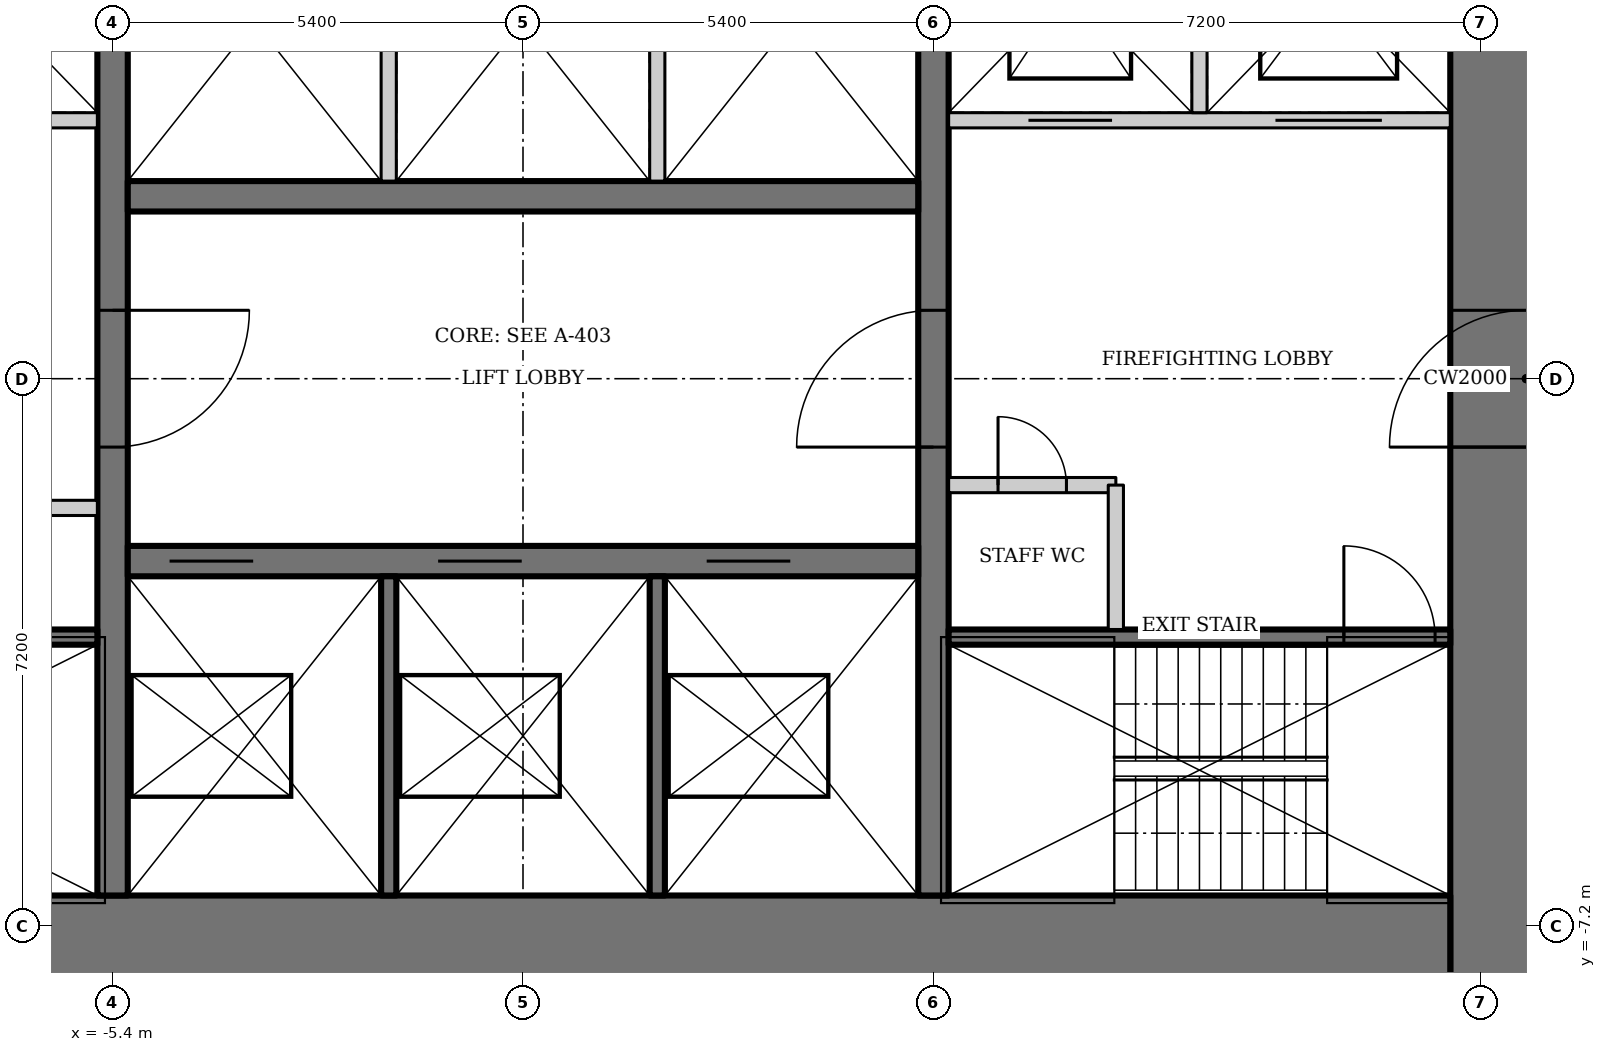
"""IFC4 building model, lengths in metres.
Left out: names, types, materials, properties, quantities, classifications, styles, units other than length and angle.
Written with IfcOpenShell. Run it as: python <this file> out.ifc"""

import sys

from ifc_helpers import new_model, si_unit, direction, frame, frame_2d, origin, place, context, subcontext, project, spatial, rectangle, extrude, element, fill, save


model = new_model("IFC4")
c1 = context("Model", 3, precision=1e-05, world=origin(), true_north=direction((0.0, 1.0)))
c2 = subcontext(c1, "Body", "Model", "MODEL_VIEW")
j1 = project(units=[si_unit("LENGTHUNIT", "METRE"), si_unit("PLANEANGLEUNIT", "RADIAN")], contexts=[c1])
p1 = place(None, origin())
s1 = spatial("IfcSite", under=j1, at=p1, CompositionType="ELEMENT")
p2 = place(p1, origin())
s2 = spatial("IfcBuilding", under=s1, at=p2, CompositionType="ELEMENT")
p3 = place(p2, frame((0.0, 0.0, 76.6)))
s3 = spatial("IfcBuildingStorey", under=s2, at=p3, CompositionType="ELEMENT", Elevation=76.6)
p4 = place(p3, frame((13.2, -13.0, 0.0), z_axis=(0.0, 0.0, 1.0), x_axis=(0.0, 1.0, 0.0)))
e1 = element("IfcWall", 1, at=p4, inside=s3, PredefinedType="SHEAR", context=c2, shape_type="SweptSolid", body=[
    extrude(rectangle(XDim=26.0, YDim=2.0, at=frame_2d((13.0, 0.0))), origin(), (0.0, 0.0, 1.0), 3.6),
])
p5 = place(p4, frame((12.1, 0.0, 0.0)))
e2 = element("IfcOpeningElement", 2, at=p5, cuts=e1, PredefinedType="OPENING", context=c2, shape_type="SweptSolid", body=[
    extrude(rectangle(XDim=1.8, YDim=2.1, at=frame_2d((0.9, 1.05))), frame((0.0, 1.01, 0.0), z_axis=(0.0, -1.0, 0.0), x_axis=(1.0, 0.0, 0.0)), (0.0, 0.0, 1.0), 2.02),
])
p6 = place(p3, frame((-12.2, -8.0, 0.0), z_axis=(0.0, 0.0, 1.0), x_axis=(1.0, 0.0, 0.0)))
e3 = element("IfcWall", 3, at=p6, inside=s3, PredefinedType="SHEAR", context=c2, shape_type="SweptSolid", body=[
    extrude(rectangle(XDim=24.4, YDim=2.4, at=frame_2d((12.2, 0.0))), origin(), (0.0, 0.0, 1.0), 3.6),
])
p7 = place(p3, frame((5.4, -6.8, 0.0), z_axis=(0.0, 0.0, 1.0), x_axis=(0.0, 1.0, 0.0)))
e4 = element("IfcWall", 4, at=p7, inside=s3, PredefinedType="SHEAR", context=c2, shape_type="SweptSolid", body=[
    extrude(rectangle(XDim=13.6, YDim=0.4, at=frame_2d((6.8, 0.0))), origin(), (0.0, 0.0, 1.0), 3.6),
])
p8 = place(p7, frame((5.9, 0.0, 0.0)))
e5 = element("IfcOpeningElement", 5, at=p8, cuts=e4, PredefinedType="OPENING", context=c2, shape_type="SweptSolid", body=[
    extrude(rectangle(XDim=1.8, YDim=2.1, at=frame_2d((0.9, 1.05))), frame((0.0, 0.21, 0.0), z_axis=(0.0, -1.0, 0.0), x_axis=(1.0, 0.0, 0.0)), (0.0, 0.0, 1.0), 0.42),
])
p9 = place(p3, frame((-5.4, 6.8, 0.0), z_axis=(0.0, 0.0, 1.0), x_axis=(0.0, -1.0, 0.0)))
e6 = element("IfcWall", 6, at=p9, inside=s3, PredefinedType="SHEAR", context=c2, shape_type="SweptSolid", body=[
    extrude(rectangle(XDim=13.6, YDim=0.4, at=frame_2d((6.8, 0.0))), origin(), (0.0, 0.0, 1.0), 3.6),
])
p10 = place(p9, frame((5.9, 0.0, 0.0)))
e7 = element("IfcOpeningElement", 7, at=p10, cuts=e6, PredefinedType="OPENING", context=c2, shape_type="SweptSolid", body=[
    extrude(rectangle(XDim=1.8, YDim=2.1, at=frame_2d((0.9, 1.05))), frame((0.0, 0.21, 0.0), z_axis=(0.0, -1.0, 0.0), x_axis=(1.0, 0.0, 0.0)), (0.0, 0.0, 1.0), 0.42),
])
p11 = place(p3, frame((-5.2, -2.4, 0.0), z_axis=(0.0, 0.0, 1.0), x_axis=(1.0, 0.0, 0.0)))
e8 = element("IfcWall", 8, at=p11, inside=s3, PredefinedType="SHEAR", context=c2, shape_type="SweptSolid", body=[
    extrude(rectangle(XDim=10.4, YDim=0.4, at=frame_2d((5.2, 0.0))), origin(), (0.0, 0.0, 1.0), 3.6),
])
p12 = place(p11, frame((0.55, 0.0, 0.0)))
e9 = element("IfcOpeningElement", 9, at=p12, cuts=e8, PredefinedType="OPENING", context=c2, shape_type="SweptSolid", body=[
    extrude(rectangle(XDim=1.1, YDim=2.2, at=frame_2d((0.55, 1.1))), frame((0.0, 0.21, 0.0), z_axis=(0.0, -1.0, 0.0), x_axis=(1.0, 0.0, 0.0)), (0.0, 0.0, 1.0), 0.42),
])
p13 = place(p11, frame((4.083, 0.0, 0.0)))
e10 = element("IfcOpeningElement", 10, at=p13, cuts=e8, PredefinedType="OPENING", context=c2, shape_type="SweptSolid", body=[
    extrude(rectangle(XDim=1.1, YDim=2.2, at=frame_2d((0.55, 1.1))), frame((0.0, 0.21, 0.0), z_axis=(0.0, -1.0, 0.0), x_axis=(1.0, 0.0, 0.0)), (0.0, 0.0, 1.0), 0.42),
])
p14 = place(p11, frame((7.617, 0.0, 0.0)))
e11 = element("IfcOpeningElement", 11, at=p14, cuts=e8, PredefinedType="OPENING", context=c2, shape_type="SweptSolid", body=[
    extrude(rectangle(XDim=1.1, YDim=2.2, at=frame_2d((0.55, 1.1))), frame((0.0, 0.21, 0.0), z_axis=(0.0, -1.0, 0.0), x_axis=(1.0, 0.0, 0.0)), (0.0, 0.0, 1.0), 0.42),
])
for number, where, z_axis, x_axis in (
    (12, (-1.767, -2.6, 0.0), (0.0, 0.0, 1.0), (0.0, -1.0, 0.0)),
    (13, (1.767, -2.6, 0.0), (0.0, 0.0, 1.0), (0.0, -1.0, 0.0)),
):
    element("IfcWall", number, at=place(p3, frame(where, z_axis=z_axis, x_axis=x_axis)), inside=s3, PredefinedType="SOLIDWALL", context=c2, shape_type="SweptSolid", body=[
        extrude(rectangle(XDim=4.2, YDim=0.2, at=frame_2d((2.1, 0.0))), origin(), (0.0, 0.0, 1.0), 3.6),
    ])
p15 = place(p3, frame((5.2, 2.4, 0.0), z_axis=(0.0, 0.0, 1.0), x_axis=(-1.0, 0.0, 0.0)))
e14 = element("IfcWall", 14, at=p15, inside=s3, PredefinedType="SHEAR", context=c2, shape_type="SweptSolid", body=[
    extrude(rectangle(XDim=10.4, YDim=0.4, at=frame_2d((5.2, 0.0))), origin(), (0.0, 0.0, 1.0), 3.6),
])
for number, where, z_axis, x_axis in (
    (15, (-1.767, 2.6, 0.0), (0.0, 0.0, 1.0), (0.0, 1.0, 0.0)),
    (16, (1.767, 2.6, 0.0), (0.0, 0.0, 1.0), (0.0, 1.0, 0.0)),
):
    element("IfcWall", number, at=place(p3, frame(where, z_axis=z_axis, x_axis=x_axis)), inside=s3, PredefinedType="SOLIDWALL", context=c2, shape_type="SweptSolid", body=[
        extrude(rectangle(XDim=4.2, YDim=0.2, at=frame_2d((2.1, 0.0))), origin(), (0.0, 0.0, 1.0), 3.6),
    ])
p16 = place(p3, frame((5.6, -3.4, 0.0), z_axis=(0.0, 0.0, 1.0), x_axis=(1.0, 0.0, 0.0)))
e17 = element("IfcWall", 17, at=p16, inside=s3, PredefinedType="SHEAR", context=c2, shape_type="SweptSolid", body=[
    extrude(rectangle(XDim=6.6, YDim=0.2, at=frame_2d((3.3, 0.0))), origin(), (0.0, 0.0, 1.0), 3.6),
])
p17 = place(p16, frame((5.2, 0.0, 0.0)))
e18 = element("IfcOpeningElement", 18, at=p17, cuts=e17, PredefinedType="OPENING", context=c2, shape_type="SweptSolid", body=[
    extrude(rectangle(XDim=1.2, YDim=2.1, at=frame_2d((0.6, 1.05))), frame((0.0, 0.11, 0.0), z_axis=(0.0, -1.0, 0.0), x_axis=(1.0, 0.0, 0.0)), (0.0, 0.0, 1.0), 0.22),
])
p18 = place(p3, frame((12.2, 3.4, 0.0), z_axis=(0.0, 0.0, 1.0), x_axis=(-1.0, 0.0, 0.0)))
e19 = element("IfcWall", 19, at=p18, inside=s3, PredefinedType="SOLIDWALL", context=c2, shape_type="SweptSolid", body=[
    extrude(rectangle(XDim=6.6, YDim=0.2, at=frame_2d((3.3, 0.0))), origin(), (0.0, 0.0, 1.0), 3.6),
])
p19 = place(p18, frame((4.45, 0.0, 0.0)))
e20 = element("IfcOpeningElement", 20, at=p19, cuts=e19, PredefinedType="OPENING", context=c2, shape_type="SweptSolid", body=[
    extrude(rectangle(XDim=1.1, YDim=2.2, at=frame_2d((0.55, 1.1))), frame((0.0, 0.11, 0.0), z_axis=(0.0, -1.0, 0.0), x_axis=(1.0, 0.0, 0.0)), (0.0, 0.0, 1.0), 0.22),
])
p20 = place(p18, frame((0.9, 0.0, 0.0)))
e21 = element("IfcOpeningElement", 21, at=p20, cuts=e19, PredefinedType="OPENING", context=c2, shape_type="SweptSolid", body=[
    extrude(rectangle(XDim=1.4, YDim=2.2, at=frame_2d((0.7, 1.1))), frame((0.0, 0.11, 0.0), z_axis=(0.0, -1.0, 0.0), x_axis=(1.0, 0.0, 0.0)), (0.0, 0.0, 1.0), 0.22),
])
p21 = place(p3, frame((8.9, 3.5, 0.0), z_axis=(0.0, 0.0, 1.0), x_axis=(0.0, 1.0, 0.0)))
e22 = element("IfcWall", 22, at=p21, inside=s3, PredefinedType="SOLIDWALL", context=c2, shape_type="SweptSolid", body=[
    extrude(rectangle(XDim=3.3, YDim=0.2, at=frame_2d((1.65, 0.0))), origin(), (0.0, 0.0, 1.0), 3.6),
])
p22 = place(p3, frame((-5.6, -3.4, 0.0), z_axis=(0.0, 0.0, 1.0), x_axis=(-1.0, 0.0, 0.0)))
e23 = element("IfcWall", 23, at=p22, inside=s3, PredefinedType="SHEAR", context=c2, shape_type="SweptSolid", body=[
    extrude(rectangle(XDim=6.6, YDim=0.2, at=frame_2d((3.3, 0.0))), origin(), (0.0, 0.0, 1.0), 3.6),
])
p23 = place(p22, frame((5.2, 0.0, 0.0)))
e24 = element("IfcOpeningElement", 24, at=p23, cuts=e23, PredefinedType="OPENING", context=c2, shape_type="SweptSolid", body=[
    extrude(rectangle(XDim=1.2, YDim=2.1, at=frame_2d((0.6, 1.05))), frame((0.0, 0.11, 0.0), z_axis=(0.0, -1.0, 0.0), x_axis=(1.0, 0.0, 0.0)), (0.0, 0.0, 1.0), 0.22),
])
p24 = place(p3, frame((-12.2, 3.4, 0.0), z_axis=(0.0, 0.0, 1.0), x_axis=(1.0, 0.0, 0.0)))
e25 = element("IfcWall", 25, at=p24, inside=s3, PredefinedType="SOLIDWALL", context=c2, shape_type="SweptSolid", body=[
    extrude(rectangle(XDim=6.6, YDim=0.2, at=frame_2d((3.3, 0.0))), origin(), (0.0, 0.0, 1.0), 3.6),
])
p25 = place(p24, frame((1.05, 0.0, 0.0)))
e26 = element("IfcOpeningElement", 26, at=p25, cuts=e25, PredefinedType="OPENING", context=c2, shape_type="SweptSolid", body=[
    extrude(rectangle(XDim=1.1, YDim=2.2, at=frame_2d((0.55, 1.1))), frame((0.0, 0.11, 0.0), z_axis=(0.0, -1.0, 0.0), x_axis=(1.0, 0.0, 0.0)), (0.0, 0.0, 1.0), 0.22),
])
p26 = place(p24, frame((4.3, 0.0, 0.0)))
e27 = element("IfcOpeningElement", 27, at=p26, cuts=e25, PredefinedType="OPENING", context=c2, shape_type="SweptSolid", body=[
    extrude(rectangle(XDim=1.4, YDim=2.2, at=frame_2d((0.7, 1.1))), frame((0.0, 0.11, 0.0), z_axis=(0.0, -1.0, 0.0), x_axis=(1.0, 0.0, 0.0)), (0.0, 0.0, 1.0), 0.22),
])
p27 = place(p3, frame((-5.6, -1.7, 0.0), z_axis=(0.0, 0.0, 1.0), x_axis=(-1.0, 0.0, 0.0)))
e28 = element("IfcWall", 28, at=p27, inside=s3, PredefinedType="SOLIDWALL", context=c2, shape_type="SweptSolid", body=[
    extrude(rectangle(XDim=3.2, YDim=0.2, at=frame_2d((1.6, 0.0))), origin(), (0.0, 0.0, 1.0), 3.45),
])
p28 = place(p27, frame((1.15, 0.0, 0.0)))
e29 = element("IfcOpeningElement", 29, at=p28, cuts=e28, PredefinedType="OPENING", context=c2, shape_type="SweptSolid", body=[
    extrude(rectangle(XDim=0.9, YDim=2.1, at=frame_2d((0.45, 1.05))), frame((0.0, 0.11, 0.0), z_axis=(0.0, -1.0, 0.0), x_axis=(1.0, 0.0, 0.0)), (0.0, 0.0, 1.0), 0.22),
])
p29 = place(p3, frame((5.6, -1.4, 0.0), z_axis=(0.0, 0.0, 1.0), x_axis=(1.0, 0.0, 0.0)))
e30 = element("IfcWall", 30, at=p29, inside=s3, PredefinedType="SOLIDWALL", context=c2, shape_type="SweptSolid", body=[
    extrude(rectangle(XDim=2.2, YDim=0.2, at=frame_2d((1.1, 0.0))), origin(), (0.0, 0.0, 1.0), 3.45),
])
p30 = place(p29, frame((0.65, 0.0, 0.0)))
e31 = element("IfcOpeningElement", 31, at=p30, cuts=e30, PredefinedType="OPENING", context=c2, shape_type="SweptSolid", body=[
    extrude(rectangle(XDim=0.9, YDim=2.1, at=frame_2d((0.45, 1.05))), frame((0.0, 0.11, 0.0), z_axis=(0.0, -1.0, 0.0), x_axis=(1.0, 0.0, 0.0)), (0.0, 0.0, 1.0), 0.22),
])
p31 = place(p3, frame((7.8, -1.4, 0.0), z_axis=(0.0, 0.0, 1.0), x_axis=(0.0, -1.0, 0.0)))
e32 = element("IfcWall", 32, at=p31, inside=s3, PredefinedType="SOLIDWALL", context=c2, shape_type="SweptSolid", body=[
    extrude(rectangle(XDim=1.9, YDim=0.2, at=frame_2d((0.95, 0.0))), origin(), (0.0, 0.0, 1.0), 3.45),
])
p32 = place(p30, origin())
e33 = element("IfcDoor", 33, at=p32, inside=s3, OperationType="SINGLE_SWING_LEFT", PredefinedType="DOOR", context=c2, shape_type="SweptSolid", body=[
    extrude(rectangle(XDim=0.9, YDim=2.1, at=frame_2d((0.45, 1.05))), frame((0.0, 0.025, 0.0), z_axis=(0.0, -1.0, 0.0), x_axis=(1.0, 0.0, 0.0)), (0.0, 0.0, 1.0), 0.05),
])
fill(e31, e33)
p33 = place(p8, origin())
e34 = element("IfcDoor", 34, at=p33, inside=s3, OperationType="DOUBLE_DOOR_DOUBLE_SWING", PredefinedType="DOOR", context=c2, shape_type="SweptSolid", body=[
    extrude(rectangle(XDim=1.8, YDim=2.1, at=frame_2d((0.9, 1.05))), frame((0.0, 0.025, 0.0), z_axis=(0.0, -1.0, 0.0), x_axis=(1.0, 0.0, 0.0)), (0.0, 0.0, 1.0), 0.05),
])
fill(e5, e34)
p34 = place(p10, origin())
e35 = element("IfcDoor", 35, at=p34, inside=s3, OperationType="DOUBLE_DOOR_DOUBLE_SWING", PredefinedType="DOOR", context=c2, shape_type="SweptSolid", body=[
    extrude(rectangle(XDim=1.8, YDim=2.1, at=frame_2d((0.9, 1.05))), frame((0.0, 0.025, 0.0), z_axis=(0.0, -1.0, 0.0), x_axis=(1.0, 0.0, 0.0)), (0.0, 0.0, 1.0), 0.05),
])
fill(e7, e35)
p35 = place(p17, origin())
e36 = element("IfcDoor", 36, at=p35, inside=s3, OperationType="SINGLE_SWING_RIGHT", PredefinedType="DOOR", context=c2, shape_type="SweptSolid", body=[
    extrude(rectangle(XDim=1.2, YDim=2.1, at=frame_2d((0.6, 1.05))), frame((0.0, 0.025, 0.0), z_axis=(0.0, -1.0, 0.0), x_axis=(1.0, 0.0, 0.0)), (0.0, 0.0, 1.0), 0.05),
])
fill(e18, e36)
p36 = place(p5, origin())
e37 = element("IfcDoor", 37, at=p36, inside=s3, OperationType="DOUBLE_DOOR_DOUBLE_SWING", PredefinedType="DOOR", context=c2, shape_type="SweptSolid", body=[
    extrude(rectangle(XDim=1.8, YDim=2.1, at=frame_2d((0.9, 1.05))), frame((0.0, 0.025, 0.0), z_axis=(0.0, -1.0, 0.0), x_axis=(1.0, 0.0, 0.0)), (0.0, 0.0, 1.0), 0.05),
])
fill(e2, e37)
p37 = place(p12, origin())
e38 = element("IfcDoor", 38, at=p37, inside=s3, OperationType="DOUBLE_DOOR_SLIDING", PredefinedType="DOOR", context=c2, shape_type="SweptSolid", body=[
    extrude(rectangle(XDim=1.1, YDim=2.2, at=frame_2d((0.55, 1.1))), frame((0.0, 0.025, 0.0), z_axis=(0.0, -1.0, 0.0), x_axis=(1.0, 0.0, 0.0)), (0.0, 0.0, 1.0), 0.05),
])
fill(e9, e38)
p38 = place(p13, origin())
e39 = element("IfcDoor", 39, at=p38, inside=s3, OperationType="DOUBLE_DOOR_SLIDING", PredefinedType="DOOR", context=c2, shape_type="SweptSolid", body=[
    extrude(rectangle(XDim=1.1, YDim=2.2, at=frame_2d((0.55, 1.1))), frame((0.0, 0.025, 0.0), z_axis=(0.0, -1.0, 0.0), x_axis=(1.0, 0.0, 0.0)), (0.0, 0.0, 1.0), 0.05),
])
fill(e10, e39)
p39 = place(p14, origin())
e40 = element("IfcDoor", 40, at=p39, inside=s3, OperationType="DOUBLE_DOOR_SLIDING", PredefinedType="DOOR", context=c2, shape_type="SweptSolid", body=[
    extrude(rectangle(XDim=1.1, YDim=2.2, at=frame_2d((0.55, 1.1))), frame((0.0, 0.025, 0.0), z_axis=(0.0, -1.0, 0.0), x_axis=(1.0, 0.0, 0.0)), (0.0, 0.0, 1.0), 0.05),
])
fill(e11, e40)
p40 = place(p19, origin())
e41 = element("IfcDoor", 41, at=p40, inside=s3, OperationType="DOUBLE_DOOR_SLIDING", PredefinedType="DOOR", context=c2, shape_type="SweptSolid", body=[
    extrude(rectangle(XDim=1.1, YDim=2.2, at=frame_2d((0.55, 1.1))), frame((0.0, 0.025, 0.0), z_axis=(0.0, -1.0, 0.0), x_axis=(1.0, 0.0, 0.0)), (0.0, 0.0, 1.0), 0.05),
])
fill(e20, e41)
p41 = place(p20, origin())
e42 = element("IfcDoor", 42, at=p41, inside=s3, OperationType="DOUBLE_DOOR_SLIDING", PredefinedType="DOOR", context=c2, shape_type="SweptSolid", body=[
    extrude(rectangle(XDim=1.4, YDim=2.2, at=frame_2d((0.7, 1.1))), frame((0.0, 0.025, 0.0), z_axis=(0.0, -1.0, 0.0), x_axis=(1.0, 0.0, 0.0)), (0.0, 0.0, 1.0), 0.05),
])
fill(e21, e42)
save(model, sys.argv[1])
